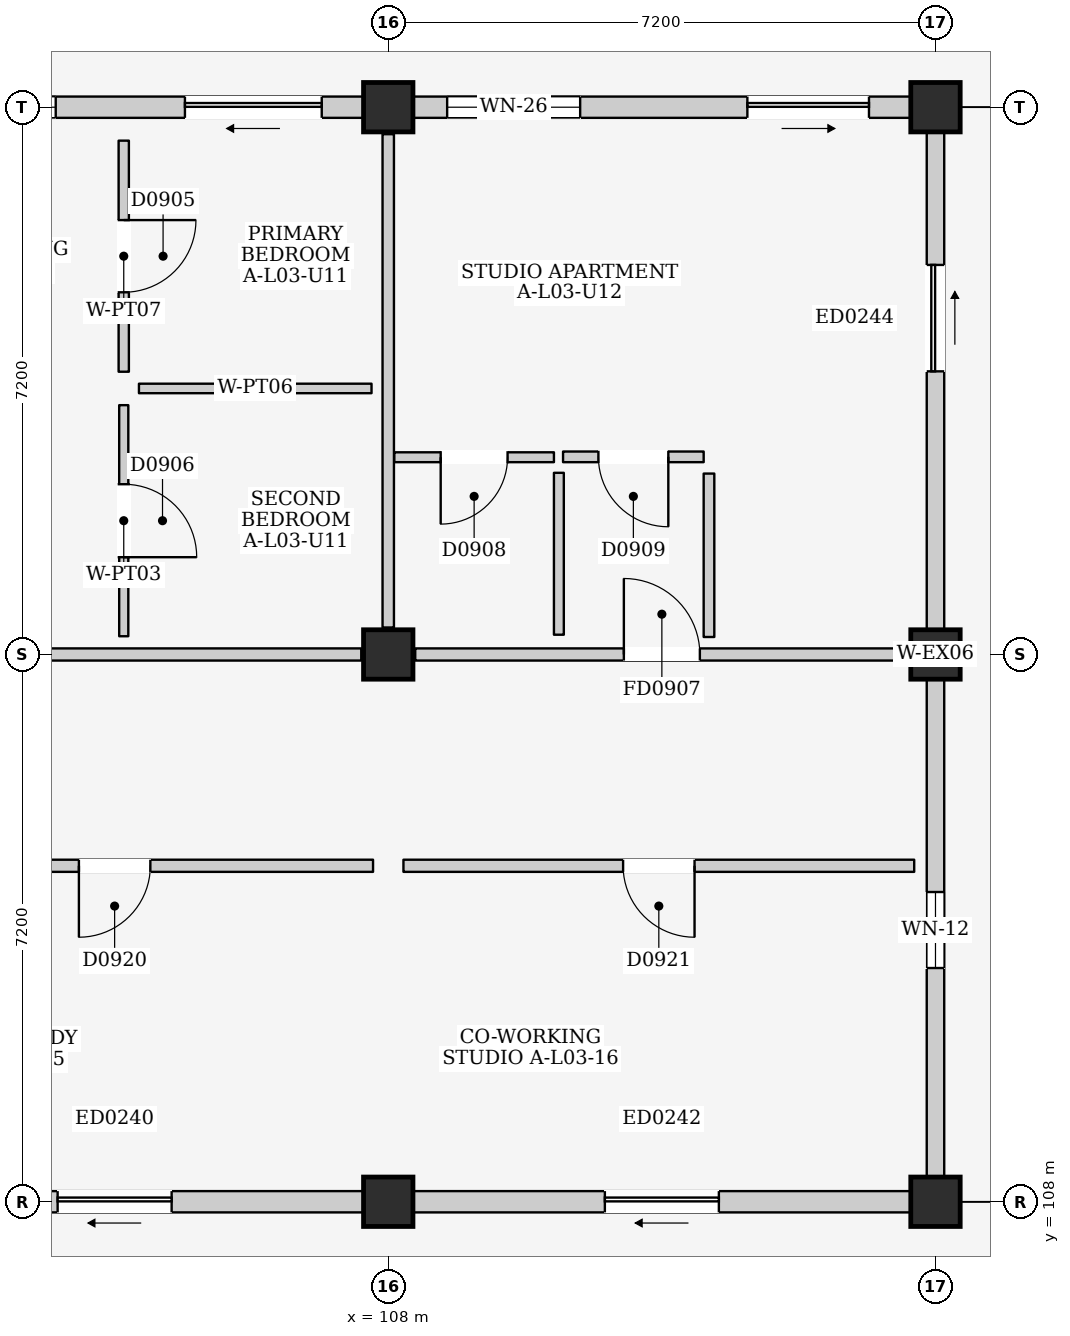
"""IFC4 building model, lengths in metres.
Left out: names, types, materials, properties, quantities, classifications, styles, units other than length and angle.
Written with IfcOpenShell. Run it as: python <this file> out.ifc"""

import sys

from ifc_helpers import new_model, si_unit, direction, frame, frame_2d, origin, origin_2d, place, context, subcontext, project, spatial, rectangle, extrude, element, fill, save


model = new_model("IFC4")
c1 = context("Model", 3, precision=1e-05, world=origin(), true_north=direction((0.0, 1.0)))
c2 = subcontext(c1, "Body", "Model", "MODEL_VIEW")
j1 = project(units=[si_unit("LENGTHUNIT", "METRE"), si_unit("PLANEANGLEUNIT", "RADIAN")], contexts=[c1])
p1 = place(None, origin())
s1 = spatial("IfcSite", under=j1, at=p1, CompositionType="ELEMENT")
p2 = place(p1, origin())
s2 = spatial("IfcBuilding", under=s1, at=p2, CompositionType="ELEMENT")
p3 = place(p2, frame((0.0, 0.0, 12.2)))
s3 = spatial("IfcBuildingStorey", under=s2, at=p3, CompositionType="ELEMENT", Elevation=12.2)
for number, where, z_axis, x_axis in (
    (1, (108.0, 108.0, 0.0), (0.0, 0.0, 1.0), (1.0, 0.0, 0.0)),
    (2, (108.0, 115.2, 0.0), (0.0, 0.0, 1.0), (1.0, 0.0, 0.0)),
    (3, (108.0, 122.4, 0.0), (0.0, 0.0, 1.0), (1.0, 0.0, 0.0)),
    (4, (115.2, 108.0, 0.0), (0.0, 0.0, 1.0), (1.0, 0.0, 0.0)),
    (5, (115.2, 115.2, 0.0), (0.0, 0.0, 1.0), (1.0, 0.0, 0.0)),
    (6, (115.2, 122.4, 0.0), (0.0, 0.0, 1.0), (1.0, 0.0, 0.0)),
):
    element("IfcColumn", number, at=place(p3, frame(where, z_axis=z_axis, x_axis=x_axis)), inside=s3, PredefinedType="COLUMN", context=c2, shape_type="SweptSolid", body=[
        extrude(rectangle(XDim=0.65, YDim=0.65, at=origin_2d()), origin(), (0.0, 0.0, 1.0), 3.2),
    ])
p4 = place(p3, frame((101.125, 122.4, 0.0), z_axis=(0.0, 0.0, 1.0), x_axis=(1.0, 0.0, 0.0)))
e7 = element("IfcWall", 7, at=p4, inside=s3, PredefinedType="ELEMENTEDWALL", context=c2, shape_type="SweptSolid", body=[
    extrude(rectangle(XDim=6.55, YDim=0.28, at=frame_2d((3.275, 0.0))), origin(), (0.0, 0.0, 1.0), 2.445),
])
p5 = place(p4, frame((4.2, 0.0, 0.0)))
e8 = element("IfcOpeningElement", 8, at=p5, cuts=e7, PredefinedType="OPENING", context=c2, shape_type="SweptSolid", body=[
    extrude(rectangle(XDim=1.8, YDim=2.12, at=frame_2d((0.9, 1.06))), frame((0.0, 0.155, 0.0), z_axis=(0.0, -1.0, 0.0), x_axis=(1.0, 0.0, 0.0)), (0.0, 0.0, 1.0), 0.31),
])
p6 = place(p4, frame((0.45, 0.0, 0.735)))
e9 = element("IfcOpeningElement", 9, at=p6, cuts=e7, PredefinedType="OPENING", context=c2, shape_type="SweptSolid", body=[
    extrude(rectangle(XDim=2.05, YDim=1.6, at=frame_2d((1.025, 0.8))), frame((0.0, 0.155, 0.0), z_axis=(0.0, -1.0, 0.0), x_axis=(1.0, 0.0, 0.0)), (0.0, 0.0, 1.0), 0.31),
])
p7 = place(p3, frame((101.125, 108.0, 0.0), z_axis=(0.0, 0.0, 1.0), x_axis=(1.0, 0.0, 0.0)))
e10 = element("IfcWall", 10, at=p7, inside=s3, PredefinedType="ELEMENTEDWALL", context=c2, shape_type="SweptSolid", body=[
    extrude(rectangle(XDim=6.55, YDim=0.28, at=frame_2d((3.275, 0.0))), origin(), (0.0, 0.0, 1.0), 2.315),
])
p8 = place(p7, frame((2.525, 0.0, 0.0)))
e11 = element("IfcOpeningElement", 11, at=p8, cuts=e10, PredefinedType="OPENING", context=c2, shape_type="SweptSolid", body=[
    extrude(rectangle(XDim=1.5, YDim=2.12, at=frame_2d((0.75, 1.06))), frame((0.0, 0.155, 0.0), z_axis=(0.0, -1.0, 0.0), x_axis=(1.0, 0.0, 0.0)), (0.0, 0.0, 1.0), 0.31),
])
p9 = place(p3, frame((108.325, 122.4, 0.0), z_axis=(0.0, 0.0, 1.0), x_axis=(1.0, 0.0, 0.0)))
e12 = element("IfcWall", 12, at=p9, inside=s3, PredefinedType="ELEMENTEDWALL", context=c2, shape_type="SweptSolid", body=[
    extrude(rectangle(XDim=6.55, YDim=0.28, at=frame_2d((3.275, 0.0))), origin(), (0.0, 0.0, 1.0), 2.445),
])
p10 = place(p9, frame((4.4, 0.0, 0.0)))
e13 = element("IfcOpeningElement", 13, at=p10, cuts=e12, PredefinedType="OPENING", context=c2, shape_type="SweptSolid", body=[
    extrude(rectangle(XDim=1.6, YDim=2.12, at=frame_2d((0.8, 1.06))), frame((0.0, 0.155, 0.0), z_axis=(0.0, -1.0, 0.0), x_axis=(1.0, 0.0, 0.0)), (0.0, 0.0, 1.0), 0.31),
])
p11 = place(p9, frame((0.45, 0.0, 0.785)))
e14 = element("IfcOpeningElement", 14, at=p11, cuts=e12, PredefinedType="OPENING", context=c2, shape_type="SweptSolid", body=[
    extrude(rectangle(XDim=1.75, YDim=1.55, at=frame_2d((0.875, 0.775))), frame((0.0, 0.155, 0.0), z_axis=(0.0, -1.0, 0.0), x_axis=(1.0, 0.0, 0.0)), (0.0, 0.0, 1.0), 0.31),
])
p12 = place(p3, frame((108.325, 108.0, 0.0), z_axis=(0.0, 0.0, 1.0), x_axis=(1.0, 0.0, 0.0)))
e15 = element("IfcWall", 15, at=p12, inside=s3, PredefinedType="ELEMENTEDWALL", context=c2, shape_type="SweptSolid", body=[
    extrude(rectangle(XDim=6.55, YDim=0.28, at=frame_2d((3.275, 0.0))), origin(), (0.0, 0.0, 1.0), 2.315),
])
p13 = place(p12, frame((2.525, 0.0, 0.0)))
e16 = element("IfcOpeningElement", 16, at=p13, cuts=e15, PredefinedType="OPENING", context=c2, shape_type="SweptSolid", body=[
    extrude(rectangle(XDim=1.5, YDim=2.12, at=frame_2d((0.75, 1.06))), frame((0.0, 0.155, 0.0), z_axis=(0.0, -1.0, 0.0), x_axis=(1.0, 0.0, 0.0)), (0.0, 0.0, 1.0), 0.31),
])
p14 = place(p3, frame((115.2, 108.325, 0.0), z_axis=(0.0, 0.0, 1.0), x_axis=(0.0, 1.0, 0.0)))
e17 = element("IfcWall", 17, at=p14, inside=s3, PredefinedType="ELEMENTEDWALL", context=c2, shape_type="SweptSolid", body=[
    extrude(rectangle(XDim=6.55, YDim=0.23, at=frame_2d((3.275, 0.0))), origin(), (0.0, 0.0, 1.0), 2.445),
])
p15 = place(p14, frame((2.75, 0.0, 1.1)))
e18 = element("IfcOpeningElement", 18, at=p15, cuts=e17, PredefinedType="OPENING", context=c2, shape_type="SweptSolid", body=[
    extrude(rectangle(XDim=1.0, YDim=0.9, at=frame_2d((0.5, 0.45))), frame((0.0, 0.13, 0.0), z_axis=(0.0, -1.0, 0.0), x_axis=(1.0, 0.0, 0.0)), (0.0, 0.0, 1.0), 0.26),
])
p16 = place(p3, frame((115.2, 115.525, 0.0), z_axis=(0.0, 0.0, 1.0), x_axis=(0.0, 1.0, 0.0)))
e19 = element("IfcWall", 19, at=p16, inside=s3, PredefinedType="ELEMENTEDWALL", context=c2, shape_type="SweptSolid", body=[
    extrude(rectangle(XDim=6.55, YDim=0.23, at=frame_2d((3.275, 0.0))), origin(), (0.0, 0.0, 1.0), 2.445),
])
p17 = place(p16, frame((3.4, 0.0, 0.0)))
e20 = element("IfcOpeningElement", 20, at=p17, cuts=e19, PredefinedType="OPENING", context=c2, shape_type="SweptSolid", body=[
    extrude(rectangle(XDim=1.4, YDim=2.1, at=frame_2d((0.7, 1.05))), frame((0.0, 0.13, 0.0), z_axis=(0.0, -1.0, 0.0), x_axis=(1.0, 0.0, 0.0)), (0.0, 0.0, 1.0), 0.26),
])
p18 = place(p3, frame((101.155, 115.2, 0.0), z_axis=(0.0, 0.0, 1.0), x_axis=(1.0, 0.0, 0.0)))
e21 = element("IfcWall", 21, at=p18, inside=s3, PredefinedType="PARTITIONING", context=c2, shape_type="SweptSolid", body=[
    extrude(rectangle(XDim=6.49, YDim=0.16, at=frame_2d((3.245, 0.0))), origin(), (0.0, 0.0, 1.0), 2.315),
])
p19 = place(p3, frame((108.0, 115.555, 0.0), z_axis=(0.0, 0.0, 1.0), x_axis=(0.0, 1.0, 0.0)))
e22 = element("IfcWall", 22, at=p19, inside=s3, PredefinedType="PARTITIONING", context=c2, shape_type="SweptSolid", body=[
    extrude(rectangle(XDim=6.49, YDim=0.15, at=frame_2d((3.245, 0.0))), origin(), (0.0, 0.0, 1.0), 2.415),
])
p20 = place(p3, frame((104.52, 118.92, 0.0), z_axis=(0.0, 0.0, 1.0), x_axis=(0.0, 1.0, 0.0)))
e23 = element("IfcWall", 23, at=p20, inside=s3, PredefinedType="PARTITIONING", context=c2, shape_type="SweptSolid", body=[
    extrude(rectangle(XDim=3.04, YDim=0.135, at=frame_2d((1.52, 0.0))), origin(), (0.0, 0.0, 1.0), 2.98),
])
p21 = place(p20, frame((1.045, 0.0, 0.0)))
e24 = element("IfcOpeningElement", 24, at=p21, cuts=e23, PredefinedType="OPENING", context=c2, shape_type="SweptSolid", body=[
    extrude(rectangle(XDim=0.95, YDim=2.15, at=frame_2d((0.475, 1.075))), frame((0.0, 0.083, 0.0), z_axis=(0.0, -1.0, 0.0), x_axis=(1.0, 0.0, 0.0)), (0.0, 0.0, 1.0), 0.165),
])
p22 = place(p3, frame((104.72, 118.7, 0.0), z_axis=(0.0, 0.0, 1.0), x_axis=(1.0, 0.0, 0.0)))
e25 = element("IfcWall", 25, at=p22, inside=s3, PredefinedType="PARTITIONING", context=c2, shape_type="SweptSolid", body=[
    extrude(rectangle(XDim=3.06, YDim=0.125, at=frame_2d((1.53, 0.0))), origin(), (0.0, 0.0, 1.0), 2.98),
])
p23 = place(p3, frame((104.52, 115.44, 0.0), z_axis=(0.0, 0.0, 1.0), x_axis=(0.0, 1.0, 0.0)))
e26 = element("IfcWall", 26, at=p23, inside=s3, PredefinedType="PARTITIONING", context=c2, shape_type="SweptSolid", body=[
    extrude(rectangle(XDim=3.04, YDim=0.12, at=frame_2d((1.52, 0.0))), origin(), (0.0, 0.0, 1.0), 2.98),
])
p24 = place(p23, frame((1.04, 0.0, 0.0)))
e27 = element("IfcOpeningElement", 27, at=p24, cuts=e26, PredefinedType="OPENING", context=c2, shape_type="SweptSolid", body=[
    extrude(rectangle(XDim=0.96, YDim=2.15, at=frame_2d((0.48, 1.075))), frame((0.0, 0.075, 0.0), z_axis=(0.0, -1.0, 0.0), x_axis=(1.0, 0.0, 0.0)), (0.0, 0.0, 1.0), 0.15),
])
p25 = place(p3, frame((108.355, 115.2, 0.0), z_axis=(0.0, 0.0, 1.0), x_axis=(1.0, 0.0, 0.0)))
e28 = element("IfcWall", 28, at=p25, inside=s3, PredefinedType="PARTITIONING", context=c2, shape_type="SweptSolid", body=[
    extrude(rectangle(XDim=6.49, YDim=0.16, at=frame_2d((3.245, 0.0))), origin(), (0.0, 0.0, 1.0), 2.315),
])
p26 = place(p25, frame((2.745, 0.0, 0.0)))
e29 = element("IfcOpeningElement", 29, at=p26, cuts=e28, PredefinedType="OPENING", context=c2, shape_type="SweptSolid", body=[
    extrude(rectangle(XDim=1.0, YDim=2.15, at=frame_2d((0.5, 1.075))), frame((0.0, 0.095, 0.0), z_axis=(0.0, -1.0, 0.0), x_axis=(1.0, 0.0, 0.0)), (0.0, 0.0, 1.0), 0.19),
])
p27 = place(p3, frame((108.08, 117.795, 0.0), z_axis=(0.0, 0.0, 1.0), x_axis=(1.0, 0.0, 0.0)))
e30 = element("IfcWall", 30, at=p27, inside=s3, PredefinedType="PARTITIONING", context=c2, shape_type="SweptSolid", body=[
    extrude(rectangle(XDim=2.1, YDim=0.13, at=frame_2d((1.05, 0.0))), origin(), (0.0, 0.0, 1.0), 2.98),
])
p28 = place(p27, frame((0.61, 0.0, 0.0)))
e31 = element("IfcOpeningElement", 31, at=p28, cuts=e30, PredefinedType="OPENING", context=c2, shape_type="SweptSolid", body=[
    extrude(rectangle(XDim=0.88, YDim=2.1, at=frame_2d((0.44, 1.05))), frame((0.0, 0.08, 0.0), z_axis=(0.0, -1.0, 0.0), x_axis=(1.0, 0.0, 0.0)), (0.0, 0.0, 1.0), 0.16),
])
p29 = place(p3, frame((110.245, 115.46, 0.0), z_axis=(0.0, 0.0, 1.0), x_axis=(0.0, 1.0, 0.0)))
e32 = element("IfcWall", 32, at=p29, inside=s3, PredefinedType="PARTITIONING", context=c2, shape_type="SweptSolid", body=[
    extrude(rectangle(XDim=2.13, YDim=0.13, at=frame_2d((1.065, 0.0))), origin(), (0.0, 0.0, 1.0), 2.98),
])
p30 = place(p3, frame((110.3, 117.8, 0.0), z_axis=(0.0, 0.0, 1.0), x_axis=(1.0, 0.0, 0.0)))
e33 = element("IfcWall", 33, at=p30, inside=s3, PredefinedType="PARTITIONING", context=c2, shape_type="SweptSolid", body=[
    extrude(rectangle(XDim=1.85, YDim=0.14, at=frame_2d((0.925, 0.0))), origin(), (0.0, 0.0, 1.0), 2.98),
])
p31 = place(p30, frame((0.465, 0.0, 0.0)))
e34 = element("IfcOpeningElement", 34, at=p31, cuts=e33, PredefinedType="OPENING", context=c2, shape_type="SweptSolid", body=[
    extrude(rectangle(XDim=0.92, YDim=2.1, at=frame_2d((0.46, 1.05))), frame((0.0, 0.085, 0.0), z_axis=(0.0, -1.0, 0.0), x_axis=(1.0, 0.0, 0.0)), (0.0, 0.0, 1.0), 0.17),
])
p32 = place(p3, frame((112.22, 115.43, 0.0), z_axis=(0.0, 0.0, 1.0), x_axis=(0.0, 1.0, 0.0)))
e35 = element("IfcWall", 35, at=p32, inside=s3, PredefinedType="PARTITIONING", context=c2, shape_type="SweptSolid", body=[
    extrude(rectangle(XDim=2.15, YDim=0.14, at=frame_2d((1.075, 0.0))), origin(), (0.0, 0.0, 1.0), 2.98),
])
p33 = place(p3, frame((101.0, 112.42, 0.0), z_axis=(0.0, 0.0, 1.0), x_axis=(1.0, 0.0, 0.0)))
e36 = element("IfcWall", 36, at=p33, inside=s3, PredefinedType="PARTITIONING", context=c2, shape_type="SweptSolid", body=[
    extrude(rectangle(XDim=6.8, YDim=0.16, at=frame_2d((3.4, 0.0))), origin(), (0.0, 0.0, 1.0), 2.98),
])
p34 = place(p33, frame((2.93, 0.0, 0.0)))
e37 = element("IfcOpeningElement", 37, at=p34, cuts=e36, PredefinedType="OPENING", context=c2, shape_type="SweptSolid", body=[
    extrude(rectangle(XDim=0.94, YDim=2.12, at=frame_2d((0.47, 1.06))), frame((0.0, 0.095, 0.0), z_axis=(0.0, -1.0, 0.0), x_axis=(1.0, 0.0, 0.0)), (0.0, 0.0, 1.0), 0.19),
])
p35 = place(p3, frame((108.2, 112.42, 0.0), z_axis=(0.0, 0.0, 1.0), x_axis=(1.0, 0.0, 0.0)))
e38 = element("IfcWall", 38, at=p35, inside=s3, PredefinedType="PARTITIONING", context=c2, shape_type="SweptSolid", body=[
    extrude(rectangle(XDim=6.72, YDim=0.16, at=frame_2d((3.36, 0.0))), origin(), (0.0, 0.0, 1.0), 2.98),
])
p36 = place(p35, frame((2.89, 0.0, 0.0)))
e39 = element("IfcOpeningElement", 39, at=p36, cuts=e38, PredefinedType="OPENING", context=c2, shape_type="SweptSolid", body=[
    extrude(rectangle(XDim=0.94, YDim=2.12, at=frame_2d((0.47, 1.06))), frame((0.0, 0.095, 0.0), z_axis=(0.0, -1.0, 0.0), x_axis=(1.0, 0.0, 0.0)), (0.0, 0.0, 1.0), 0.19),
])
p37 = place(p5, frame((1.8, 0.0, 0.0), z_axis=(0.0, 0.0, 1.0), x_axis=(-1.0, 0.0, 0.0)))
e40 = element("IfcDoor", 40, at=p37, inside=s3, OperationType="SLIDING_TO_LEFT", PredefinedType="DOOR", context=c2, shape_type="SweptSolid", body=[
    extrude(rectangle(XDim=1.8, YDim=2.12, at=frame_2d((0.9, 1.06))), frame((0.0, 0.025, 0.0), z_axis=(0.0, -1.0, 0.0), x_axis=(1.0, 0.0, 0.0)), (0.0, 0.0, 1.0), 0.05),
])
fill(e8, e40)
p38 = place(p6, origin())
e41 = element("IfcWindow", 41, at=p38, inside=s3, PartitioningType="DOUBLE_PANEL_VERTICAL", PredefinedType="WINDOW", context=c2, shape_type="SweptSolid", body=[
    extrude(rectangle(XDim=2.05, YDim=1.6, at=frame_2d((1.025, 0.8))), frame((0.0, 0.03, 0.0), z_axis=(0.0, -1.0, 0.0), x_axis=(1.0, 0.0, 0.0)), (0.0, 0.0, 1.0), 0.06),
])
fill(e9, e41)
p39 = place(p8, frame((1.5, 0.0, 0.0), z_axis=(0.0, 0.0, 1.0), x_axis=(-1.0, 0.0, 0.0)))
e42 = element("IfcDoor", 42, at=p39, inside=s3, OperationType="SLIDING_TO_LEFT", PredefinedType="DOOR", context=c2, shape_type="SweptSolid", body=[
    extrude(rectangle(XDim=1.5, YDim=2.12, at=frame_2d((0.75, 1.06))), frame((0.0, 0.025, 0.0), z_axis=(0.0, -1.0, 0.0), x_axis=(1.0, 0.0, 0.0)), (0.0, 0.0, 1.0), 0.05),
])
fill(e11, e42)
p40 = place(p10, frame((1.6, 0.0, 0.0), z_axis=(0.0, 0.0, 1.0), x_axis=(-1.0, 0.0, 0.0)))
e43 = element("IfcDoor", 43, at=p40, inside=s3, OperationType="SLIDING_TO_RIGHT", PredefinedType="DOOR", context=c2, shape_type="SweptSolid", body=[
    extrude(rectangle(XDim=1.6, YDim=2.12, at=frame_2d((0.8, 1.06))), frame((0.0, 0.025, 0.0), z_axis=(0.0, -1.0, 0.0), x_axis=(1.0, 0.0, 0.0)), (0.0, 0.0, 1.0), 0.05),
])
fill(e13, e43)
p41 = place(p11, origin())
e44 = element("IfcWindow", 44, at=p41, inside=s3, PartitioningType="DOUBLE_PANEL_VERTICAL", PredefinedType="WINDOW", context=c2, shape_type="SweptSolid", body=[
    extrude(rectangle(XDim=1.75, YDim=1.55, at=frame_2d((0.875, 0.775))), frame((0.0, 0.03, 0.0), z_axis=(0.0, -1.0, 0.0), x_axis=(1.0, 0.0, 0.0)), (0.0, 0.0, 1.0), 0.06),
])
fill(e14, e44)
p42 = place(p13, frame((1.5, 0.0, 0.0), z_axis=(0.0, 0.0, 1.0), x_axis=(-1.0, 0.0, 0.0)))
e45 = element("IfcDoor", 45, at=p42, inside=s3, OperationType="SLIDING_TO_LEFT", PredefinedType="DOOR", context=c2, shape_type="SweptSolid", body=[
    extrude(rectangle(XDim=1.5, YDim=2.12, at=frame_2d((0.75, 1.06))), frame((0.0, 0.025, 0.0), z_axis=(0.0, -1.0, 0.0), x_axis=(1.0, 0.0, 0.0)), (0.0, 0.0, 1.0), 0.05),
])
fill(e16, e45)
p43 = place(p15, origin())
e46 = element("IfcWindow", 46, at=p43, inside=s3, PartitioningType="SINGLE_PANEL", PredefinedType="WINDOW", context=c2, shape_type="SweptSolid", body=[
    extrude(rectangle(XDim=1.0, YDim=0.9, at=frame_2d((0.5, 0.45))), frame((0.0, 0.03, 0.0), z_axis=(0.0, -1.0, 0.0), x_axis=(1.0, 0.0, 0.0)), (0.0, 0.0, 1.0), 0.06),
])
fill(e18, e46)
p44 = place(p17, frame((1.4, 0.0, 0.0), z_axis=(0.0, 0.0, 1.0), x_axis=(-1.0, 0.0, 0.0)))
e47 = element("IfcDoor", 47, at=p44, inside=s3, OperationType="SLIDING_TO_RIGHT", PredefinedType="DOOR", context=c2, shape_type="SweptSolid", body=[
    extrude(rectangle(XDim=1.4, YDim=2.1, at=frame_2d((0.7, 1.05))), frame((0.0, 0.025, 0.0), z_axis=(0.0, -1.0, 0.0), x_axis=(1.0, 0.0, 0.0)), (0.0, 0.0, 1.0), 0.05),
])
fill(e20, e47)
p45 = place(p21, frame((0.95, 0.0, 0.0), z_axis=(0.0, 0.0, 1.0), x_axis=(-1.0, 0.0, 0.0)))
e48 = element("IfcDoor", 48, at=p45, inside=s3, OperationType="SINGLE_SWING_LEFT", PredefinedType="DOOR", context=c2, shape_type="SweptSolid", body=[
    extrude(rectangle(XDim=0.95, YDim=2.15, at=frame_2d((0.475, 1.075))), frame((0.0, 0.025, 0.0), z_axis=(0.0, -1.0, 0.0), x_axis=(1.0, 0.0, 0.0)), (0.0, 0.0, 1.0), 0.05),
])
fill(e24, e48)
p46 = place(p24, frame((0.96, 0.0, 0.0), z_axis=(0.0, 0.0, 1.0), x_axis=(-1.0, 0.0, 0.0)))
e49 = element("IfcDoor", 49, at=p46, inside=s3, OperationType="SINGLE_SWING_RIGHT", PredefinedType="DOOR", context=c2, shape_type="SweptSolid", body=[
    extrude(rectangle(XDim=0.96, YDim=2.15, at=frame_2d((0.48, 1.075))), frame((0.0, 0.025, 0.0), z_axis=(0.0, -1.0, 0.0), x_axis=(1.0, 0.0, 0.0)), (0.0, 0.0, 1.0), 0.05),
])
fill(e27, e49)
p47 = place(p26, origin())
e50 = element("IfcDoor", 50, at=p47, inside=s3, OperationType="SINGLE_SWING_LEFT", PredefinedType="DOOR", context=c2, shape_type="SweptSolid", body=[
    extrude(rectangle(XDim=1.0, YDim=2.15, at=frame_2d((0.5, 1.075))), frame((0.0, 0.025, 0.0), z_axis=(0.0, -1.0, 0.0), x_axis=(1.0, 0.0, 0.0)), (0.0, 0.0, 1.0), 0.05),
])
fill(e29, e50)
p48 = place(p28, frame((0.88, 0.0, 0.0), z_axis=(0.0, 0.0, 1.0), x_axis=(-1.0, 0.0, 0.0)))
e51 = element("IfcDoor", 51, at=p48, inside=s3, OperationType="SINGLE_SWING_RIGHT", PredefinedType="DOOR", context=c2, shape_type="SweptSolid", body=[
    extrude(rectangle(XDim=0.88, YDim=2.1, at=frame_2d((0.44, 1.05))), frame((0.0, 0.025, 0.0), z_axis=(0.0, -1.0, 0.0), x_axis=(1.0, 0.0, 0.0)), (0.0, 0.0, 1.0), 0.05),
])
fill(e31, e51)
p49 = place(p31, frame((0.92, 0.0, 0.0), z_axis=(0.0, 0.0, 1.0), x_axis=(-1.0, 0.0, 0.0)))
e52 = element("IfcDoor", 52, at=p49, inside=s3, OperationType="SINGLE_SWING_LEFT", PredefinedType="DOOR", context=c2, shape_type="SweptSolid", body=[
    extrude(rectangle(XDim=0.92, YDim=2.1, at=frame_2d((0.46, 1.05))), frame((0.0, 0.025, 0.0), z_axis=(0.0, -1.0, 0.0), x_axis=(1.0, 0.0, 0.0)), (0.0, 0.0, 1.0), 0.05),
])
fill(e34, e52)
p50 = place(p34, frame((0.94, 0.0, 0.0), z_axis=(0.0, 0.0, 1.0), x_axis=(-1.0, 0.0, 0.0)))
e53 = element("IfcDoor", 53, at=p50, inside=s3, OperationType="SINGLE_SWING_RIGHT", PredefinedType="DOOR", context=c2, shape_type="SweptSolid", body=[
    extrude(rectangle(XDim=0.94, YDim=2.12, at=frame_2d((0.47, 1.06))), frame((0.0, 0.025, 0.0), z_axis=(0.0, -1.0, 0.0), x_axis=(1.0, 0.0, 0.0)), (0.0, 0.0, 1.0), 0.05),
])
fill(e37, e53)
p51 = place(p36, frame((0.94, 0.0, 0.0), z_axis=(0.0, 0.0, 1.0), x_axis=(-1.0, 0.0, 0.0)))
e54 = element("IfcDoor", 54, at=p51, inside=s3, OperationType="SINGLE_SWING_LEFT", PredefinedType="DOOR", context=c2, shape_type="SweptSolid", body=[
    extrude(rectangle(XDim=0.94, YDim=2.12, at=frame_2d((0.47, 1.06))), frame((0.0, 0.025, 0.0), z_axis=(0.0, -1.0, 0.0), x_axis=(1.0, 0.0, 0.0)), (0.0, 0.0, 1.0), 0.05),
])
fill(e39, e54)
save(model, sys.argv[1])
